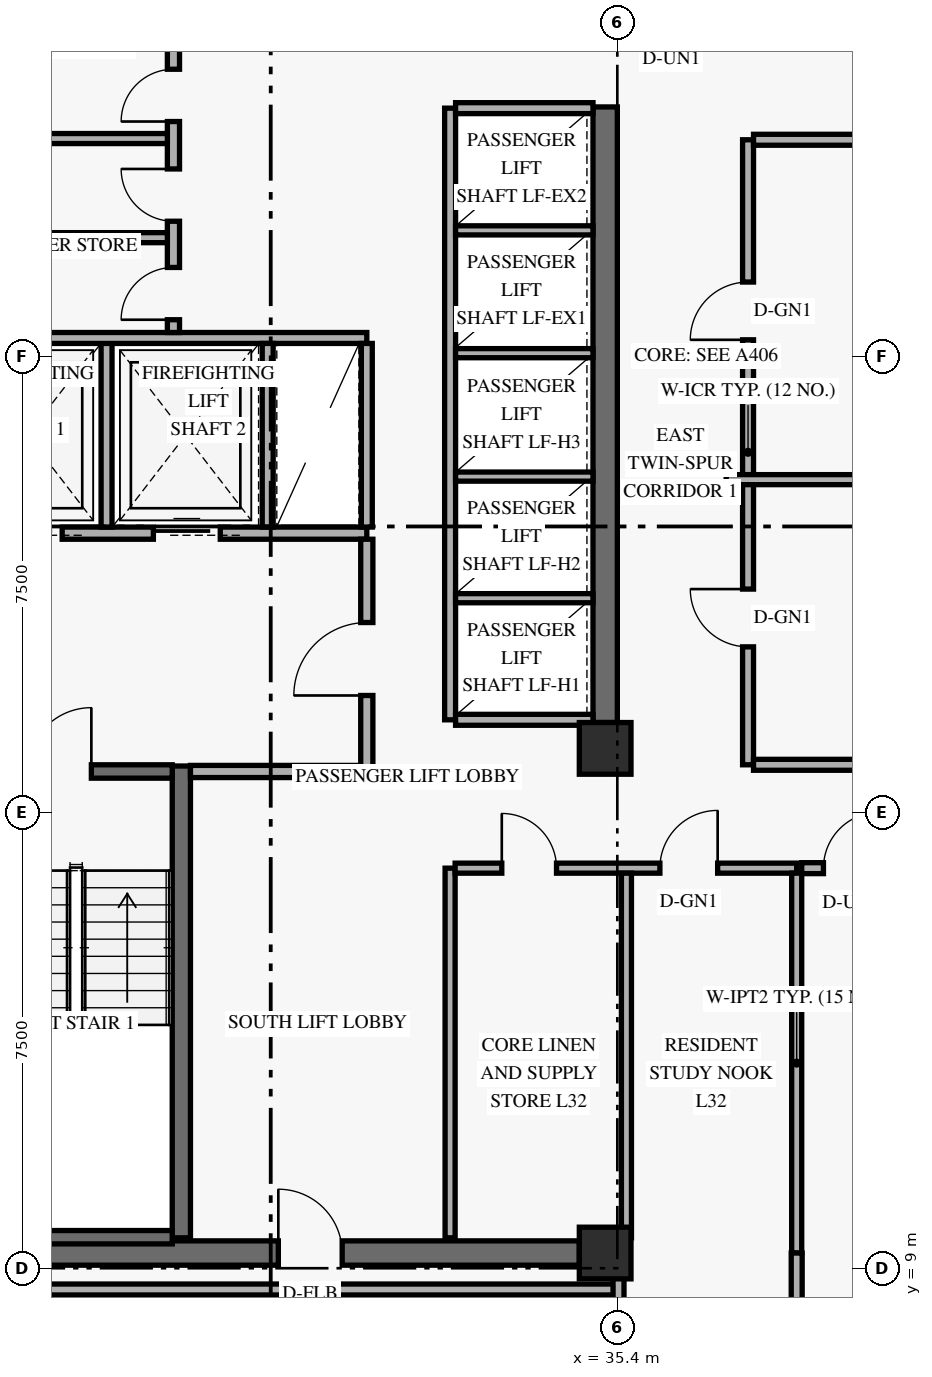
"""IFC4 building model, lengths in metres.
Left out: names, types, materials, properties, quantities, classifications, styles, units other than length and angle.
Written with IfcOpenShell. Run it as: python <this file> out.ifc"""

import sys

from ifc_helpers import new_model, si_unit, direction, frame, frame_2d, origin, origin_2d, place, context, subcontext, project, spatial, rectangle, extrude, element, fill, save


model = new_model("IFC4")
c1 = context("Model", 3, precision=1e-05, world=origin(), true_north=direction((0.0, 1.0)))
c2 = subcontext(c1, "Body", "Model", "MODEL_VIEW")
j1 = project(units=[si_unit("LENGTHUNIT", "METRE"), si_unit("PLANEANGLEUNIT", "RADIAN")], contexts=[c1])
p1 = place(None, origin())
s1 = spatial("IfcSite", under=j1, at=p1, CompositionType="ELEMENT")
p2 = place(p1, origin())
s2 = spatial("IfcBuilding", under=s1, at=p2, CompositionType="ELEMENT")
p3 = place(p2, frame((0.0, 0.0, 124.8)))
s3 = spatial("IfcBuildingStorey", under=s2, at=p3, CompositionType="ELEMENT", Elevation=124.8)
p4 = place(p3, frame((35.2, 17.975, 0.0), z_axis=(0.0, 0.0, 1.0), x_axis=(0.0, 1.0, 0.0)))
e1 = element("IfcWall", 1, at=p4, inside=s3, PredefinedType="SHEAR", context=c2, shape_type="SweptSolid", body=[
    extrude(rectangle(XDim=10.125, YDim=0.4, at=frame_2d((5.062, 0.0))), origin(), (0.0, 0.0, 1.0), 2.749),
])
p5 = place(p3, frame((24.625, 9.25, 0.0), z_axis=(0.0, 0.0, 1.0), x_axis=(1.0, 0.0, 0.0)))
e2 = element("IfcWall", 2, at=p5, inside=s3, PredefinedType="SHEAR", context=c2, shape_type="SweptSolid", body=[
    extrude(rectangle(XDim=10.15, YDim=0.4, at=frame_2d((5.075, 0.0))), origin(), (0.0, 0.0, 1.0), 3.36),
])
p6 = place(p5, frame((5.2, 0.0, 0.0)))
e3 = element("IfcOpeningElement", 3, at=p6, cuts=e2, PredefinedType="OPENING", context=c2, shape_type="SweptSolid", body=[
    extrude(rectangle(XDim=1.05, YDim=2.15, at=frame_2d((0.525, 1.075))), frame((0.0, 0.21, 0.0), z_axis=(0.0, -1.0, 0.0), x_axis=(1.0, 0.0, 0.0)), (0.0, 0.0, 1.0), 0.42),
])
p7 = place(p3, frame((28.23, 9.5, 0.0), z_axis=(0.0, 0.0, 1.0), x_axis=(0.0, 1.0, 0.0)))
e4 = element("IfcWall", 4, at=p7, inside=s3, PredefinedType="SHEAR", context=c2, shape_type="SweptSolid", body=[
    extrude(rectangle(XDim=7.76, YDim=0.3, at=frame_2d((3.88, 0.0))), origin(), (0.0, 0.0, 1.0), 3.36),
])
p8 = place(p3, frame((24.92, 9.51, 0.0), z_axis=(0.0, 0.0, 1.0), x_axis=(1.0, 0.0, 0.0)))
e5 = element("IfcWall", 5, at=p8, inside=s3, PredefinedType="SHEAR", context=c2, shape_type="SweptSolid", body=[
    extrude(rectangle(XDim=3.16, YDim=0.22, at=frame_2d((1.58, 0.0))), origin(), (0.0, 0.0, 1.0), 3.36),
])
p9 = place(p3, frame((24.92, 17.17, 0.0), z_axis=(0.0, 0.0, 1.0), x_axis=(1.0, 0.0, 0.0)))
e6 = element("IfcWall", 6, at=p9, inside=s3, PredefinedType="SHEAR", context=c2, shape_type="SweptSolid", body=[
    extrude(rectangle(XDim=3.16, YDim=0.22, at=frame_2d((1.58, 0.0))), origin(), (0.0, 0.0, 1.0), 3.36),
])
p10 = place(p9, frame((0.78, 0.0, 0.0)))
e7 = element("IfcOpeningElement", 7, at=p10, cuts=e6, PredefinedType="OPENING", context=c2, shape_type="SweptSolid", body=[
    extrude(rectangle(XDim=1.05, YDim=2.15, at=frame_2d((0.525, 1.075))), frame((0.0, 0.12, 0.0), z_axis=(0.0, -1.0, 0.0), x_axis=(1.0, 0.0, 0.0)), (0.0, 0.0, 1.0), 0.24),
])
for number, where, z_axis, x_axis in (
    (8, (35.2, 9.25, 0.0), (0.0, 0.0, 1.0), (1.0, 0.0, 0.0)),
    (9, (35.2, 17.55, 0.0), (0.0, 0.0, 1.0), (1.0, 0.0, 0.0)),
):
    element("IfcColumn", number, at=place(p3, frame(where, z_axis=z_axis, x_axis=x_axis)), inside=s3, PredefinedType="COLUMN", context=c2, shape_type="SweptSolid", body=[
        extrude(rectangle(XDim=0.85, YDim=0.85, at=origin_2d()), origin(), (0.0, 0.0, 1.0), 3.6),
    ])
p11 = place(p3, frame((24.45, 21.09, 0.0), z_axis=(0.0, 0.0, 1.0), x_axis=(1.0, 0.0, 0.0)))
e10 = element("IfcWall", 10, at=p11, inside=s3, PredefinedType="STANDARD", context=c2, shape_type="SweptSolid", body=[
    extrude(rectangle(XDim=6.83, YDim=0.2, at=frame_2d((3.415, 0.0))), origin(), (0.0, 0.0, 1.0), 3.36),
])
p12 = place(p11, frame((0.72, 0.0, 0.0)))
e11 = element("IfcOpeningElement", 11, at=p12, cuts=e10, PredefinedType="OPENING", context=c2, shape_type="SweptSolid", body=[
    extrude(rectangle(XDim=1.1, YDim=2.2, at=frame_2d((0.55, 1.1))), frame((0.0, 0.11, 0.0), z_axis=(0.0, -1.0, 0.0), x_axis=(1.0, 0.0, 0.0)), (0.0, 0.0, 1.0), 0.22),
])
p13 = place(p11, frame((3.32, 0.0, 0.0)))
e12 = element("IfcOpeningElement", 12, at=p13, cuts=e10, PredefinedType="OPENING", context=c2, shape_type="SweptSolid", body=[
    extrude(rectangle(XDim=1.1, YDim=2.2, at=frame_2d((0.55, 1.1))), frame((0.0, 0.11, 0.0), z_axis=(0.0, -1.0, 0.0), x_axis=(1.0, 0.0, 0.0)), (0.0, 0.0, 1.0), 0.22),
])
p14 = place(p3, frame((28.38, 17.17, 0.0), z_axis=(0.0, 0.0, 1.0), x_axis=(1.0, 0.0, 0.0)))
e13 = element("IfcWall", 13, at=p14, inside=s3, PredefinedType="STANDARD", context=c2, shape_type="SweptSolid", body=[
    extrude(rectangle(XDim=2.9, YDim=0.2, at=frame_2d((1.45, 0.0))), origin(), (0.0, 0.0, 1.0), 3.36),
])
p15 = place(p3, frame((31.28, 17.07, 0.0), z_axis=(0.0, 0.0, 1.0), x_axis=(0.0, 1.0, 0.0)))
e14 = element("IfcWall", 14, at=p15, inside=s3, PredefinedType="STANDARD", context=c2, shape_type="SweptSolid", body=[
    extrude(rectangle(XDim=3.92, YDim=0.2, at=frame_2d((1.96, 0.0))), origin(), (0.0, 0.0, 1.0), 2.731),
])
p16 = place(p15, frame((1.35, 0.0, 0.0)))
e15 = element("IfcOpeningElement", 15, at=p16, cuts=e14, PredefinedType="OPENING", context=c2, shape_type="SweptSolid", body=[
    extrude(rectangle(XDim=1.2, YDim=2.15, at=frame_2d((0.6, 1.075))), frame((0.0, 0.11, 0.0), z_axis=(0.0, -1.0, 0.0), x_axis=(1.0, 0.0, 0.0)), (0.0, 0.0, 1.0), 0.22),
])
p17 = place(p3, frame((27.0, 21.19, 0.0), z_axis=(0.0, 0.0, 1.0), x_axis=(0.0, 1.0, 0.0)))
e16 = element("IfcWall", 16, at=p17, inside=s3, PredefinedType="STANDARD", context=c2, shape_type="SweptSolid", body=[
    extrude(rectangle(XDim=3.11, YDim=0.18, at=frame_2d((1.555, 0.0))), origin(), (0.0, 0.0, 1.0), 3.36),
])
p18 = place(p3, frame((24.45, 24.3, 0.0), z_axis=(0.0, 0.0, 1.0), x_axis=(1.0, 0.0, 0.0)))
e17 = element("IfcWall", 17, at=p18, inside=s3, PredefinedType="STANDARD", context=c2, shape_type="SweptSolid", body=[
    extrude(rectangle(XDim=6.83, YDim=0.18, at=frame_2d((3.415, 0.0))), origin(), (0.0, 0.0, 1.0), 3.36),
])
for number, where, z_axis, x_axis in (
    (18, (29.65, 21.19, 0.0), (0.0, 0.0, 1.0), (0.0, 1.0, 0.0)),
    (19, (31.28, 21.19, 0.0), (0.0, 0.0, 1.0), (0.0, 1.0, 0.0)),
):
    element("IfcWall", number, at=place(p3, frame(where, z_axis=z_axis, x_axis=x_axis)), inside=s3, PredefinedType="STANDARD", context=c2, shape_type="SweptSolid", body=[
        extrude(rectangle(XDim=3.02, YDim=0.18, at=frame_2d((1.51, 0.0))), origin(), (0.0, 0.0, 1.0), 3.36),
    ])
p19 = place(p3, frame((28.1, 24.39, 0.0), z_axis=(0.0, 0.0, 1.0), x_axis=(0.0, 1.0, 0.0)))
e20 = element("IfcWall", 20, at=p19, inside=s3, PredefinedType="STANDARD", context=c2, shape_type="SweptSolid", body=[
    extrude(rectangle(XDim=4.75, YDim=0.2, at=frame_2d((2.375, 0.0))), origin(), (0.0, 0.0, 1.0), 3.36),
])
p20 = place(p19, frame((0.21, 0.0, 0.0)))
e21 = element("IfcOpeningElement", 21, at=p20, cuts=e20, PredefinedType="OPENING", context=c2, shape_type="SweptSolid", body=[
    extrude(rectangle(XDim=0.86, YDim=2.1, at=frame_2d((0.43, 1.05))), frame((0.0, 0.11, 0.0), z_axis=(0.0, -1.0, 0.0), x_axis=(1.0, 0.0, 0.0)), (0.0, 0.0, 1.0), 0.22),
])
p21 = place(p19, frame((1.83, 0.0, 0.0)))
e22 = element("IfcOpeningElement", 22, at=p21, cuts=e20, PredefinedType="OPENING", context=c2, shape_type="SweptSolid", body=[
    extrude(rectangle(XDim=0.86, YDim=2.1, at=frame_2d((0.43, 1.05))), frame((0.0, 0.11, 0.0), z_axis=(0.0, -1.0, 0.0), x_axis=(1.0, 0.0, 0.0)), (0.0, 0.0, 1.0), 0.22),
])
p22 = place(p19, frame((3.47, 0.0, 0.0)))
e23 = element("IfcOpeningElement", 23, at=p22, cuts=e20, PredefinedType="OPENING", context=c2, shape_type="SweptSolid", body=[
    extrude(rectangle(XDim=0.86, YDim=2.1, at=frame_2d((0.43, 1.05))), frame((0.0, 0.11, 0.0), z_axis=(0.0, -1.0, 0.0), x_axis=(1.0, 0.0, 0.0)), (0.0, 0.0, 1.0), 0.22),
])
for number, where, z_axis, x_axis in (
    (24, (24.45, 25.95, 0.0), (0.0, 0.0, 1.0), (1.0, 0.0, 0.0)),
    (25, (24.45, 27.58, 0.0), (0.0, 0.0, 1.0), (1.0, 0.0, 0.0)),
):
    element("IfcWall", number, at=place(p3, frame(where, z_axis=z_axis, x_axis=x_axis)), inside=s3, PredefinedType="PARTITIONING", context=c2, shape_type="SweptSolid", body=[
        extrude(rectangle(XDim=3.55, YDim=0.165, at=frame_2d((1.775, 0.0))), origin(), (0.0, 0.0, 1.0), 3.36),
    ])
p23 = place(p3, frame((32.65, 18.02, 0.0), z_axis=(0.0, 0.0, 1.0), x_axis=(0.0, 1.0, 0.0)))
e26 = element("IfcWall", 26, at=p23, inside=s3, PredefinedType="STANDARD", context=c2, shape_type="SweptSolid", body=[
    extrude(rectangle(XDim=10.06, YDim=0.18, at=frame_2d((5.03, 0.0))), origin(), (0.0, 0.0, 1.0), 3.36),
])
for number, where, z_axis, x_axis in (
    (27, (32.74, 18.02, 0.0), (0.0, 0.0, 1.0), (1.0, 0.0, 0.0)),
    (28, (32.74, 28.08, 0.0), (0.0, 0.0, 1.0), (1.0, 0.0, 0.0)),
):
    element("IfcWall", number, at=place(p3, frame(where, z_axis=z_axis, x_axis=x_axis)), inside=s3, PredefinedType="STANDARD", context=c2, shape_type="SweptSolid", body=[
        extrude(rectangle(XDim=2.26, YDim=0.18, at=frame_2d((1.13, 0.0))), origin(), (0.0, 0.0, 1.0), 3.36),
    ])
for number, where, z_axis, x_axis in (
    (29, (32.74, 20.02, 0.0), (0.0, 0.0, 1.0), (1.0, 0.0, 0.0)),
    (30, (32.74, 22.02, 0.0), (0.0, 0.0, 1.0), (1.0, 0.0, 0.0)),
    (31, (32.74, 24.05, 0.0), (0.0, 0.0, 1.0), (1.0, 0.0, 0.0)),
    (32, (32.74, 26.07, 0.0), (0.0, 0.0, 1.0), (1.0, 0.0, 0.0)),
):
    element("IfcWall", number, at=place(p3, frame(where, z_axis=z_axis, x_axis=x_axis)), inside=s3, PredefinedType="STANDARD", context=c2, shape_type="SweptSolid", body=[
        extrude(rectangle(XDim=2.26, YDim=0.15, at=frame_2d((1.13, 0.0))), origin(), (0.0, 0.0, 1.0), 3.36),
    ])
p24 = place(p3, frame((32.65, 9.5, 0.0), z_axis=(0.0, 0.0, 1.0), x_axis=(0.0, 1.0, 0.0)))
e33 = element("IfcWall", 33, at=p24, inside=s3, PredefinedType="PARTITIONING", context=c2, shape_type="SweptSolid", body=[
    extrude(rectangle(XDim=6.08, YDim=0.165, at=frame_2d((3.04, 0.0))), origin(), (0.0, 0.0, 1.0), 3.36),
])
p25 = place(p3, frame((32.732, 15.58, 0.0), z_axis=(0.0, 0.0, 1.0), x_axis=(1.0, 0.0, 0.0)))
e34 = element("IfcWall", 34, at=p25, inside=s3, PredefinedType="PARTITIONING", context=c2, shape_type="SweptSolid", body=[
    extrude(rectangle(XDim=5.618, YDim=0.165, at=frame_2d((2.809, 0.0))), origin(), (0.0, 0.0, 1.0), 2.731),
])
p26 = place(p25, frame((0.768, 0.0, 0.0)))
e35 = element("IfcOpeningElement", 35, at=p26, cuts=e34, PredefinedType="OPENING", context=c2, shape_type="SweptSolid", body=[
    extrude(rectangle(XDim=0.9, YDim=2.1, at=frame_2d((0.45, 1.05))), frame((0.0, 0.093, 0.0), z_axis=(0.0, -1.0, 0.0), x_axis=(1.0, 0.0, 0.0)), (0.0, 0.0, 1.0), 0.185),
])
p27 = place(p25, frame((3.367, 0.0, 0.0)))
e36 = element("IfcOpeningElement", 36, at=p27, cuts=e34, PredefinedType="OPENING", context=c2, shape_type="SweptSolid", body=[
    extrude(rectangle(XDim=0.95, YDim=2.15, at=frame_2d((0.475, 1.075))), frame((0.0, 0.093, 0.0), z_axis=(0.0, -1.0, 0.0), x_axis=(1.0, 0.0, 0.0)), (0.0, 0.0, 1.0), 0.185),
])
p28 = place(p3, frame((38.35, 9.25, 0.0), z_axis=(0.0, 0.0, 1.0), x_axis=(0.0, 1.0, 0.0)))
e37 = element("IfcWall", 37, at=p28, inside=s3, PredefinedType="PARTITIONING", context=c2, shape_type="SweptSolid", body=[
    extrude(rectangle(XDim=6.248, YDim=0.165, at=frame_2d((3.124, 0.0))), origin(), (0.0, 0.0, 1.0), 2.731),
])
p29 = place(p3, frame((35.55, 9.5, 0.0), z_axis=(0.0, 0.0, 1.0), x_axis=(0.0, 1.0, 0.0)))
e38 = element("IfcWall", 38, at=p29, inside=s3, PredefinedType="PARTITIONING", context=c2, shape_type="SweptSolid", body=[
    extrude(rectangle(XDim=5.998, YDim=0.165, at=frame_2d((2.999, 0.0))), origin(), (0.0, 0.0, 1.0), 2.988),
])
p30 = place(p3, frame((37.55, 17.28, 0.0), z_axis=(0.0, 0.0, 1.0), x_axis=(0.0, 1.0, 0.0)))
e39 = element("IfcWall", 39, at=p30, inside=s3, PredefinedType="STANDARD", context=c2, shape_type="SweptSolid", body=[
    extrude(rectangle(XDim=10.28, YDim=0.18, at=frame_2d((5.14, 0.0))), origin(), (0.0, 0.0, 1.0), 2.731),
])
p31 = place(p30, frame((1.94, 0.0, 0.0)))
e40 = element("IfcOpeningElement", 40, at=p31, cuts=e39, PredefinedType="OPENING", context=c2, shape_type="SweptSolid", body=[
    extrude(rectangle(XDim=0.95, YDim=2.15, at=frame_2d((0.475, 1.075))), frame((0.0, 0.1, 0.0), z_axis=(0.0, -1.0, 0.0), x_axis=(1.0, 0.0, 0.0)), (0.0, 0.0, 1.0), 0.2),
])
p32 = place(p30, frame((6.99, 0.0, 0.0)))
e41 = element("IfcOpeningElement", 41, at=p32, cuts=e39, PredefinedType="OPENING", context=c2, shape_type="SweptSolid", body=[
    extrude(rectangle(XDim=0.95, YDim=2.15, at=frame_2d((0.475, 1.075))), frame((0.0, 0.1, 0.0), z_axis=(0.0, -1.0, 0.0), x_axis=(1.0, 0.0, 0.0)), (0.0, 0.0, 1.0), 0.2),
])
p33 = place(p3, frame((38.433, 15.58, 0.0), z_axis=(0.0, 0.0, 1.0), x_axis=(1.0, 0.0, 0.0)))
e42 = element("IfcWall", 42, at=p33, inside=s3, PredefinedType="STANDARD", context=c2, shape_type="SweptSolid", body=[
    extrude(rectangle(XDim=8.567, YDim=0.18, at=frame_2d((4.284, 0.0))), origin(), (0.0, 0.0, 1.0), 2.731),
])
p34 = place(p33, frame((0.357, 0.0, 0.0)))
e43 = element("IfcOpeningElement", 43, at=p34, cuts=e42, PredefinedType="OPENING", context=c2, shape_type="SweptSolid", body=[
    extrude(rectangle(XDim=0.92, YDim=2.15, at=frame_2d((0.46, 1.075))), frame((0.0, 0.1, 0.0), z_axis=(0.0, -1.0, 0.0), x_axis=(1.0, 0.0, 0.0)), (0.0, 0.0, 1.0), 0.2),
])
p35 = place(p3, frame((37.64, 17.28, 0.0), z_axis=(0.0, 0.0, 1.0), x_axis=(1.0, 0.0, 0.0)))
e44 = element("IfcWall", 44, at=p35, inside=s3, PredefinedType="STANDARD", context=c2, shape_type="SweptSolid", body=[
    extrude(rectangle(XDim=9.36, YDim=0.18, at=frame_2d((4.68, 0.0))), origin(), (0.0, 0.0, 1.0), 2.731),
])
p36 = place(p35, frame((7.377, 0.0, 0.0)))
e45 = element("IfcOpeningElement", 45, at=p36, cuts=e44, PredefinedType="OPENING", context=c2, shape_type="SweptSolid", body=[
    extrude(rectangle(XDim=0.92, YDim=2.15, at=frame_2d((0.46, 1.075))), frame((0.0, 0.1, 0.0), z_axis=(0.0, -1.0, 0.0), x_axis=(1.0, 0.0, 0.0)), (0.0, 0.0, 1.0), 0.2),
])
p37 = place(p3, frame((37.64, 27.56, 0.0), z_axis=(0.0, 0.0, 1.0), x_axis=(1.0, 0.0, 0.0)))
e46 = element("IfcWall", 46, at=p37, inside=s3, PredefinedType="STANDARD", context=c2, shape_type="SweptSolid", body=[
    extrude(rectangle(XDim=9.36, YDim=0.18, at=frame_2d((4.68, 0.0))), origin(), (0.0, 0.0, 1.0), 2.731),
])
p38 = place(p3, frame((23.85, 8.65, 0.0), z_axis=(0.0, 0.0, 1.0), x_axis=(1.0, 0.0, 0.0)))
e47 = element("IfcWall", 47, at=p38, inside=s3, PredefinedType="STANDARD", context=c2, shape_type="SweptSolid", body=[
    extrude(rectangle(XDim=11.57, YDim=0.18, at=frame_2d((5.785, 0.0))), origin(), (0.0, 0.0, 1.0), 2.731),
])
p39 = place(p3, frame((35.42, 2.98, 0.0), z_axis=(0.0, 0.0, 1.0), x_axis=(0.0, 1.0, 0.0)))
e48 = element("IfcWall", 48, at=p39, inside=s3, PredefinedType="PARTITIONING", context=c2, shape_type="SweptSolid", body=[
    extrude(rectangle(XDim=6.27, YDim=0.18, at=frame_2d((3.135, 0.0))), origin(), (0.0, 0.0, 1.0), 2.731),
])
p40 = place(p39, frame((1.57, 0.0, 0.0)))
e49 = element("IfcOpeningElement", 49, at=p40, cuts=e48, PredefinedType="OPENING", context=c2, shape_type="SweptSolid", body=[
    extrude(rectangle(XDim=0.88, YDim=2.12, at=frame_2d((0.44, 1.06))), frame((0.0, 0.1, 0.0), z_axis=(0.0, -1.0, 0.0), x_axis=(1.0, 0.0, 0.0)), (0.0, 0.0, 1.0), 0.2),
])
p41 = place(p3, frame((38.35, 2.98, 0.0), z_axis=(0.0, 0.0, 1.0), x_axis=(0.0, 1.0, 0.0)))
e50 = element("IfcWall", 50, at=p41, inside=s3, PredefinedType="PARTITIONING", context=c2, shape_type="SweptSolid", body=[
    extrude(rectangle(XDim=6.27, YDim=0.18, at=frame_2d((3.135, 0.0))), origin(), (0.0, 0.0, 1.0), 2.731),
])
p42 = place(p3, frame((37.19, 21.97, 0.0), z_axis=(0.0, 0.0, 1.0), x_axis=(1.0, 0.0, 0.0)))
e51 = element("IfcWall", 51, at=p42, inside=s3, PredefinedType="PARTITIONING", context=c2, shape_type="SweptSolid", body=[
    extrude(rectangle(XDim=5.445, YDim=0.165, at=frame_2d((2.723, 0.0))), origin(), (0.0, 0.0, 1.0), 3.36),
])
p43 = place(p10, frame((1.05, 0.0, 0.0), z_axis=(0.0, 0.0, 1.0), x_axis=(-1.0, 0.0, 0.0)))
e52 = element("IfcDoor", 52, at=p43, inside=s3, OperationType="SINGLE_SWING_LEFT", PredefinedType="DOOR", context=c2, shape_type="SweptSolid", body=[
    extrude(rectangle(XDim=1.05, YDim=2.15, at=frame_2d((0.525, 1.075))), frame((0.0, 0.025, 0.0), z_axis=(0.0, -1.0, 0.0), x_axis=(1.0, 0.0, 0.0)), (0.0, 0.0, 1.0), 0.05),
])
fill(e7, e52)
p44 = place(p12, origin())
e53 = element("IfcDoor", 53, at=p44, inside=s3, OperationType="SLIDING_TO_LEFT", PredefinedType="DOOR", context=c2, shape_type="SweptSolid", body=[
    extrude(rectangle(XDim=1.1, YDim=2.2, at=frame_2d((0.55, 1.1))), frame((0.0, 0.025, 0.0), z_axis=(0.0, -1.0, 0.0), x_axis=(1.0, 0.0, 0.0)), (0.0, 0.0, 1.0), 0.05),
])
fill(e11, e53)
p45 = place(p13, origin())
e54 = element("IfcDoor", 54, at=p45, inside=s3, OperationType="SLIDING_TO_LEFT", PredefinedType="DOOR", context=c2, shape_type="SweptSolid", body=[
    extrude(rectangle(XDim=1.1, YDim=2.2, at=frame_2d((0.55, 1.1))), frame((0.0, 0.025, 0.0), z_axis=(0.0, -1.0, 0.0), x_axis=(1.0, 0.0, 0.0)), (0.0, 0.0, 1.0), 0.05),
])
fill(e12, e54)
p46 = place(p16, origin())
e55 = element("IfcDoor", 55, at=p46, inside=s3, OperationType="SINGLE_SWING_LEFT", PredefinedType="DOOR", context=c2, shape_type="SweptSolid", body=[
    extrude(rectangle(XDim=1.2, YDim=2.15, at=frame_2d((0.6, 1.075))), frame((0.0, 0.025, 0.0), z_axis=(0.0, -1.0, 0.0), x_axis=(1.0, 0.0, 0.0)), (0.0, 0.0, 1.0), 0.05),
])
fill(e15, e55)
p47 = place(p20, origin())
e56 = element("IfcDoor", 56, at=p47, inside=s3, OperationType="SINGLE_SWING_LEFT", PredefinedType="DOOR", context=c2, shape_type="SweptSolid", body=[
    extrude(rectangle(XDim=0.86, YDim=2.1, at=frame_2d((0.43, 1.05))), frame((0.0, 0.025, 0.0), z_axis=(0.0, -1.0, 0.0), x_axis=(1.0, 0.0, 0.0)), (0.0, 0.0, 1.0), 0.05),
])
fill(e21, e56)
p48 = place(p21, origin())
e57 = element("IfcDoor", 57, at=p48, inside=s3, OperationType="SINGLE_SWING_RIGHT", PredefinedType="DOOR", context=c2, shape_type="SweptSolid", body=[
    extrude(rectangle(XDim=0.86, YDim=2.1, at=frame_2d((0.43, 1.05))), frame((0.0, 0.025, 0.0), z_axis=(0.0, -1.0, 0.0), x_axis=(1.0, 0.0, 0.0)), (0.0, 0.0, 1.0), 0.05),
])
fill(e22, e57)
p49 = place(p22, origin())
e58 = element("IfcDoor", 58, at=p49, inside=s3, OperationType="SINGLE_SWING_LEFT", PredefinedType="DOOR", context=c2, shape_type="SweptSolid", body=[
    extrude(rectangle(XDim=0.86, YDim=2.1, at=frame_2d((0.43, 1.05))), frame((0.0, 0.025, 0.0), z_axis=(0.0, -1.0, 0.0), x_axis=(1.0, 0.0, 0.0)), (0.0, 0.0, 1.0), 0.05),
])
fill(e23, e58)
p50 = place(p26, origin())
e59 = element("IfcDoor", 59, at=p50, inside=s3, OperationType="SINGLE_SWING_LEFT", PredefinedType="DOOR", context=c2, shape_type="SweptSolid", body=[
    extrude(rectangle(XDim=0.9, YDim=2.1, at=frame_2d((0.45, 1.05))), frame((0.0, 0.025, 0.0), z_axis=(0.0, -1.0, 0.0), x_axis=(1.0, 0.0, 0.0)), (0.0, 0.0, 1.0), 0.05),
])
fill(e35, e59)
p51 = place(p27, origin())
e60 = element("IfcDoor", 60, at=p51, inside=s3, OperationType="SINGLE_SWING_RIGHT", PredefinedType="DOOR", context=c2, shape_type="SweptSolid", body=[
    extrude(rectangle(XDim=0.95, YDim=2.15, at=frame_2d((0.475, 1.075))), frame((0.0, 0.025, 0.0), z_axis=(0.0, -1.0, 0.0), x_axis=(1.0, 0.0, 0.0)), (0.0, 0.0, 1.0), 0.05),
])
fill(e36, e60)
p52 = place(p6, origin())
e61 = element("IfcDoor", 61, at=p52, inside=s3, OperationType="SINGLE_SWING_LEFT", PredefinedType="DOOR", context=c2, shape_type="SweptSolid", body=[
    extrude(rectangle(XDim=1.05, YDim=2.15, at=frame_2d((0.525, 1.075))), frame((0.0, 0.025, 0.0), z_axis=(0.0, -1.0, 0.0), x_axis=(1.0, 0.0, 0.0)), (0.0, 0.0, 1.0), 0.05),
])
fill(e3, e61)
p53 = place(p34, origin())
e62 = element("IfcDoor", 62, at=p53, inside=s3, OperationType="SINGLE_SWING_RIGHT", PredefinedType="DOOR", context=c2, shape_type="SweptSolid", body=[
    extrude(rectangle(XDim=0.92, YDim=2.15, at=frame_2d((0.46, 1.075))), frame((0.0, 0.025, 0.0), z_axis=(0.0, -1.0, 0.0), x_axis=(1.0, 0.0, 0.0)), (0.0, 0.0, 1.0), 0.05),
])
fill(e43, e62)
p54 = place(p31, origin())
e63 = element("IfcDoor", 63, at=p54, inside=s3, OperationType="SINGLE_SWING_RIGHT", PredefinedType="DOOR", context=c2, shape_type="SweptSolid", body=[
    extrude(rectangle(XDim=0.95, YDim=2.15, at=frame_2d((0.475, 1.075))), frame((0.0, 0.025, 0.0), z_axis=(0.0, -1.0, 0.0), x_axis=(1.0, 0.0, 0.0)), (0.0, 0.0, 1.0), 0.05),
])
fill(e40, e63)
p55 = place(p32, origin())
e64 = element("IfcDoor", 64, at=p55, inside=s3, OperationType="SINGLE_SWING_LEFT", PredefinedType="DOOR", context=c2, shape_type="SweptSolid", body=[
    extrude(rectangle(XDim=0.95, YDim=2.15, at=frame_2d((0.475, 1.075))), frame((0.0, 0.025, 0.0), z_axis=(0.0, -1.0, 0.0), x_axis=(1.0, 0.0, 0.0)), (0.0, 0.0, 1.0), 0.05),
])
fill(e41, e64)
save(model, sys.argv[1])
